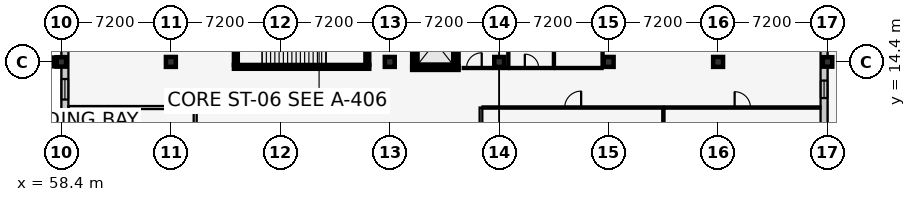
"""IFC4 building model, lengths in metres.
Left out: names, types, materials, properties, quantities, classifications, styles, units other than length and angle.
Written with IfcOpenShell. Run it as: python <this file> out.ifc"""

import sys

from ifc_helpers import new_model, si_unit, direction, frame, frame_2d, origin, origin_2d, place, context, subcontext, project, spatial, rectangle, extrude, element, fill, save


model = new_model("IFC4")
c1 = context("Model", 3, precision=1e-05, world=origin(), true_north=direction((0.0, 1.0)))
c2 = subcontext(c1, "Body", "Model", "MODEL_VIEW")
j1 = project(units=[si_unit("LENGTHUNIT", "METRE"), si_unit("PLANEANGLEUNIT", "RADIAN")], contexts=[c1])
p1 = place(None, origin())
s1 = spatial("IfcSite", under=j1, at=p1, CompositionType="ELEMENT")
p2 = place(p1, origin())
s2 = spatial("IfcBuilding", under=s1, at=p2, CompositionType="ELEMENT")
p3 = place(p2, origin())
s3 = spatial("IfcBuildingStorey", under=s2, at=p3, CompositionType="ELEMENT", Elevation=0.0)
p4 = place(p3, frame((57.6, 14.4, 0.0), z_axis=(0.0, 0.0, 1.0), x_axis=(1.0, 0.0, 0.0)))
e1 = element("IfcColumn", 1, at=p4, inside=s3, PredefinedType="COLUMN", context=c2, shape_type="SweptSolid", body=[
    extrude(rectangle(XDim=0.58, YDim=0.58, at=origin_2d()), origin(), (0.0, 0.0, 1.0), 5.4),
])
p5 = place(p3, frame((58.4, 14.4, 0.0), z_axis=(0.0, 0.0, 1.0), x_axis=(1.0, 0.0, 0.0)))
e2 = element("IfcColumn", 2, at=p5, inside=s3, PredefinedType="COLUMN", context=c2, shape_type="SweptSolid", body=[
    extrude(rectangle(XDim=0.62, YDim=0.62, at=origin_2d()), origin(), (0.0, 0.0, 1.0), 5.4),
])
for number, where, z_axis, x_axis in (
    (3, (65.6, 14.4, 0.0), (0.0, 0.0, 1.0), (1.0, 0.0, 0.0)),
    (4, (80.0, 14.4, 0.0), (0.0, 0.0, 1.0), (1.0, 0.0, 0.0)),
    (5, (87.2, 14.4, 0.0), (0.0, 0.0, 1.0), (1.0, 0.0, 0.0)),
    (6, (94.4, 14.4, 0.0), (0.0, 0.0, 1.0), (1.0, 0.0, 0.0)),
    (7, (101.6, 14.4, 0.0), (0.0, 0.0, 1.0), (1.0, 0.0, 0.0)),
):
    element("IfcColumn", number, at=place(p3, frame(where, z_axis=z_axis, x_axis=x_axis)), inside=s3, PredefinedType="COLUMN", context=c2, shape_type="SweptSolid", body=[
        extrude(rectangle(XDim=0.65, YDim=0.65, at=origin_2d()), origin(), (0.0, 0.0, 1.0), 5.4),
    ])
p6 = place(p3, frame((108.8, 14.4, 0.0), z_axis=(0.0, 0.0, 1.0), x_axis=(1.0, 0.0, 0.0)))
e8 = element("IfcColumn", 8, at=p6, inside=s3, PredefinedType="COLUMN", context=c2, shape_type="SweptSolid", body=[
    extrude(rectangle(XDim=0.62, YDim=0.62, at=origin_2d()), origin(), (0.0, 0.0, 1.0), 5.4),
])
p7 = place(p3, frame((108.57, 21.6, 0.0), z_axis=(0.0, 0.0, 1.0), x_axis=(0.0, -1.0, 0.0)))
e9 = element("IfcWall", 9, at=p7, inside=s3, PredefinedType="SOLIDWALL", context=c2, shape_type="SweptSolid", body=[
    extrude(rectangle(XDim=21.6, YDim=0.46, at=frame_2d((10.8, 0.0))), origin(), (0.0, 0.0, 1.0), 4.545),
])
p8 = place(p7, frame((1.35, 0.0, 0.9)))
e10 = element("IfcOpeningElement", 10, at=p8, cuts=e9, PredefinedType="OPENING", context=c2, shape_type="SweptSolid", body=[
    extrude(rectangle(XDim=0.9, YDim=1.6, at=frame_2d((0.45, 0.8))), frame((0.0, 0.242, 0.0), z_axis=(0.0, -1.0, 0.0), x_axis=(1.0, 0.0, 0.0)), (0.0, 0.0, 1.0), 0.484),
])
p9 = place(p7, frame((4.875, 0.0, 0.9)))
e11 = element("IfcOpeningElement", 11, at=p9, cuts=e9, PredefinedType="OPENING", context=c2, shape_type="SweptSolid", body=[
    extrude(rectangle(XDim=1.05, YDim=1.6, at=frame_2d((0.525, 0.8))), frame((0.0, 0.242, 0.0), z_axis=(0.0, -1.0, 0.0), x_axis=(1.0, 0.0, 0.0)), (0.0, 0.0, 1.0), 0.484),
])
p10 = place(p7, frame((8.425, 0.0, 0.9)))
e12 = element("IfcOpeningElement", 12, at=p10, cuts=e9, PredefinedType="OPENING", context=c2, shape_type="SweptSolid", body=[
    extrude(rectangle(XDim=1.15, YDim=1.6, at=frame_2d((0.575, 0.8))), frame((0.0, 0.242, 0.0), z_axis=(0.0, -1.0, 0.0), x_axis=(1.0, 0.0, 0.0)), (0.0, 0.0, 1.0), 0.484),
])
p11 = place(p7, frame((11.975, 0.0, 0.9)))
e13 = element("IfcOpeningElement", 13, at=p11, cuts=e9, PredefinedType="OPENING", context=c2, shape_type="SweptSolid", body=[
    extrude(rectangle(XDim=1.25, YDim=1.6, at=frame_2d((0.625, 0.8))), frame((0.0, 0.242, 0.0), z_axis=(0.0, -1.0, 0.0), x_axis=(1.0, 0.0, 0.0)), (0.0, 0.0, 1.0), 0.484),
])
p12 = place(p7, frame((15.51, 0.0, 0.9)))
e14 = element("IfcOpeningElement", 14, at=p12, cuts=e9, PredefinedType="OPENING", context=c2, shape_type="SweptSolid", body=[
    extrude(rectangle(XDim=1.38, YDim=1.6, at=frame_2d((0.69, 0.8))), frame((0.0, 0.242, 0.0), z_axis=(0.0, -1.0, 0.0), x_axis=(1.0, 0.0, 0.0)), (0.0, 0.0, 1.0), 0.484),
])
p13 = place(p7, frame((19.05, 0.0, 0.9)))
e15 = element("IfcOpeningElement", 15, at=p13, cuts=e9, PredefinedType="OPENING", context=c2, shape_type="SweptSolid", body=[
    extrude(rectangle(XDim=1.5, YDim=1.6, at=frame_2d((0.75, 0.8))), frame((0.0, 0.242, 0.0), z_axis=(0.0, -1.0, 0.0), x_axis=(1.0, 0.0, 0.0)), (0.0, 0.0, 1.0), 0.484),
])
p14 = place(p3, frame((58.63, 0.0, 0.0), z_axis=(0.0, 0.0, 1.0), x_axis=(0.0, 1.0, 0.0)))
e16 = element("IfcWall", 16, at=p14, inside=s3, PredefinedType="SOLIDWALL", context=c2, shape_type="SweptSolid", body=[
    extrude(rectangle(XDim=21.6, YDim=0.46, at=frame_2d((10.8, 0.0))), origin(), (0.0, 0.0, 1.0), 4.545),
])
p15 = place(p14, frame((1.275, 0.0, 0.9)))
e17 = element("IfcOpeningElement", 17, at=p15, cuts=e16, PredefinedType="OPENING", context=c2, shape_type="SweptSolid", body=[
    extrude(rectangle(XDim=1.05, YDim=1.45, at=frame_2d((0.525, 0.725))), frame((0.0, 0.242, 0.0), z_axis=(0.0, -1.0, 0.0), x_axis=(1.0, 0.0, 0.0)), (0.0, 0.0, 1.0), 0.484),
])
p16 = place(p14, frame((4.825, 0.0, 0.9)))
e18 = element("IfcOpeningElement", 18, at=p16, cuts=e16, PredefinedType="OPENING", context=c2, shape_type="SweptSolid", body=[
    extrude(rectangle(XDim=1.15, YDim=1.45, at=frame_2d((0.575, 0.725))), frame((0.0, 0.242, 0.0), z_axis=(0.0, -1.0, 0.0), x_axis=(1.0, 0.0, 0.0)), (0.0, 0.0, 1.0), 0.484),
])
p17 = place(p14, frame((8.375, 0.0, 0.9)))
e19 = element("IfcOpeningElement", 19, at=p17, cuts=e16, PredefinedType="OPENING", context=c2, shape_type="SweptSolid", body=[
    extrude(rectangle(XDim=1.25, YDim=1.45, at=frame_2d((0.625, 0.725))), frame((0.0, 0.242, 0.0), z_axis=(0.0, -1.0, 0.0), x_axis=(1.0, 0.0, 0.0)), (0.0, 0.0, 1.0), 0.484),
])
p18 = place(p14, frame((11.925, 0.0, 0.9)))
e20 = element("IfcOpeningElement", 20, at=p18, cuts=e16, PredefinedType="OPENING", context=c2, shape_type="SweptSolid", body=[
    extrude(rectangle(XDim=1.35, YDim=1.45, at=frame_2d((0.675, 0.725))), frame((0.0, 0.242, 0.0), z_axis=(0.0, -1.0, 0.0), x_axis=(1.0, 0.0, 0.0)), (0.0, 0.0, 1.0), 0.484),
])
p19 = place(p14, frame((15.475, 0.0, 0.9)))
e21 = element("IfcOpeningElement", 21, at=p19, cuts=e16, PredefinedType="OPENING", context=c2, shape_type="SweptSolid", body=[
    extrude(rectangle(XDim=1.45, YDim=1.45, at=frame_2d((0.725, 0.725))), frame((0.0, 0.242, 0.0), z_axis=(0.0, -1.0, 0.0), x_axis=(1.0, 0.0, 0.0)), (0.0, 0.0, 1.0), 0.484),
])
p20 = place(p14, frame((19.35, 0.0, 0.9)))
e22 = element("IfcOpeningElement", 22, at=p20, cuts=e16, PredefinedType="OPENING", context=c2, shape_type="SweptSolid", body=[
    extrude(rectangle(XDim=0.9, YDim=1.6, at=frame_2d((0.45, 0.8))), frame((0.0, 0.242, 0.0), z_axis=(0.0, -1.0, 0.0), x_axis=(1.0, 0.0, 0.0)), (0.0, 0.0, 1.0), 0.484),
])
p21 = place(p3, frame((69.75, 14.075, 0.0), z_axis=(0.0, 0.0, 1.0), x_axis=(1.0, 0.0, 0.0)))
e23 = element("IfcWall", 23, at=p21, inside=s3, PredefinedType="SHEAR", context=c2, shape_type="SweptSolid", body=[
    extrude(rectangle(XDim=8.9, YDim=0.25, at=frame_2d((4.45, 0.0))), origin(), (0.0, 0.0, 1.0), 5.15),
])
p22 = place(p3, frame((69.875, 17.65, 0.0), z_axis=(0.0, 0.0, 1.0), x_axis=(0.0, -1.0, 0.0)))
e24 = element("IfcWall", 24, at=p22, inside=s3, PredefinedType="SHEAR", context=c2, shape_type="SweptSolid", body=[
    extrude(rectangle(XDim=3.45, YDim=0.25, at=frame_2d((1.725, 0.0))), origin(), (0.0, 0.0, 1.0), 5.15),
])
p23 = place(p22, frame((1.15, 0.0, 0.0)))
e25 = element("IfcOpeningElement", 25, at=p23, cuts=e24, PredefinedType="OPENING", context=c2, shape_type="SweptSolid", body=[
    extrude(rectangle(XDim=1.15, YDim=2.15, at=frame_2d((0.575, 1.075))), frame((0.0, 0.137, 0.0), z_axis=(0.0, -1.0, 0.0), x_axis=(1.0, 0.0, 0.0)), (0.0, 0.0, 1.0), 0.274),
])
p24 = place(p3, frame((78.525, 14.2, 0.0), z_axis=(0.0, 0.0, 1.0), x_axis=(0.0, 1.0, 0.0)))
e26 = element("IfcWall", 26, at=p24, inside=s3, PredefinedType="SHEAR", context=c2, shape_type="SweptSolid", body=[
    extrude(rectangle(XDim=3.45, YDim=0.25, at=frame_2d((1.725, 0.0))), origin(), (0.0, 0.0, 1.0), 5.15),
])
p25 = place(p3, frame((81.475, 14.0, 0.0), z_axis=(0.0, 0.0, 1.0), x_axis=(1.0, 0.0, 0.0)))
e27 = element("IfcWall", 27, at=p25, inside=s3, PredefinedType="SHEAR", context=c2, shape_type="SweptSolid", body=[
    extrude(rectangle(XDim=3.05, YDim=0.25, at=frame_2d((1.525, 0.0))), origin(), (0.0, 0.0, 1.0), 5.15),
])
p26 = place(p25, frame((0.725, 0.0, 0.0)))
e28 = element("IfcOpeningElement", 28, at=p26, cuts=e27, PredefinedType="OPENING", context=c2, shape_type="SweptSolid", body=[
    extrude(rectangle(XDim=1.6, YDim=2.3, at=frame_2d((0.8, 1.15))), frame((0.0, 0.137, 0.0), z_axis=(0.0, -1.0, 0.0), x_axis=(1.0, 0.0, 0.0)), (0.0, 0.0, 1.0), 0.274),
])
for number, where, z_axis, x_axis in (
    (29, (81.6, 17.4, 0.0), (0.0, 0.0, 1.0), (0.0, -1.0, 0.0)),
    (30, (84.4, 14.0, 0.0), (0.0, 0.0, 1.0), (0.0, 1.0, 0.0)),
):
    element("IfcWall", number, at=place(p3, frame(where, z_axis=z_axis, x_axis=x_axis)), inside=s3, PredefinedType="SHEAR", context=c2, shape_type="SweptSolid", body=[
        extrude(rectangle(XDim=3.4, YDim=0.25, at=frame_2d((1.7, 0.0))), origin(), (0.0, 0.0, 1.0), 5.15),
    ])
p27 = place(p3, frame((58.87, 11.4, 0.0), z_axis=(0.0, 0.0, 1.0), x_axis=(1.0, 0.0, 0.0)))
e31 = element("IfcWall", 31, at=p27, inside=s3, PredefinedType="PARTITIONING", context=c2, shape_type="SweptSolid", body=[
    extrude(rectangle(XDim=8.33, YDim=0.2, at=frame_2d((4.165, 0.0))), origin(), (0.0, 0.0, 1.0), 5.15),
])
p28 = place(p3, frame((67.2, 0.47, 0.0), z_axis=(0.0, 0.0, 1.0), x_axis=(0.0, 1.0, 0.0)))
e32 = element("IfcWall", 32, at=p28, inside=s3, PredefinedType="PARTITIONING", context=c2, shape_type="SweptSolid", body=[
    extrude(rectangle(XDim=10.82, YDim=0.2, at=frame_2d((5.41, 0.0))), origin(), (0.0, 0.0, 1.0), 5.15),
])
p29 = place(p28, frame((0.25, 0.0, 0.0)))
e33 = element("IfcOpeningElement", 33, at=p29, cuts=e32, PredefinedType="OPENING", context=c2, shape_type="SweptSolid", body=[
    extrude(rectangle(XDim=1.76, YDim=2.3, at=frame_2d((0.88, 1.15))), frame((0.0, 0.112, 0.0), z_axis=(0.0, -1.0, 0.0), x_axis=(1.0, 0.0, 0.0)), (0.0, 0.0, 1.0), 0.224),
])
p30 = place(p3, frame((86.0, 0.47, 0.0), z_axis=(0.0, 0.0, 1.0), x_axis=(0.0, 1.0, 0.0)))
e34 = element("IfcWall", 34, at=p30, inside=s3, PredefinedType="PARTITIONING", context=c2, shape_type="SweptSolid", body=[
    extrude(rectangle(XDim=10.93, YDim=0.18, at=frame_2d((5.465, 0.0))), origin(), (0.0, 0.0, 1.0), 5.15),
])
p31 = place(p3, frame((86.1, 11.4, 0.0), z_axis=(0.0, 0.0, 1.0), x_axis=(1.0, 0.0, 0.0)))
e35 = element("IfcWall", 35, at=p31, inside=s3, PredefinedType="PARTITIONING", context=c2, shape_type="SweptSolid", body=[
    extrude(rectangle(XDim=11.9, YDim=0.15, at=frame_2d((5.95, 0.0))), origin(), (0.0, 0.0, 1.0), 5.15),
])
p32 = place(p31, frame((5.41, 0.0, 0.0)))
e36 = element("IfcOpeningElement", 36, at=p32, cuts=e35, PredefinedType="OPENING", context=c2, shape_type="SweptSolid", body=[
    extrude(rectangle(XDim=1.08, YDim=2.15, at=frame_2d((0.54, 1.075))), frame((0.0, 0.087, 0.0), z_axis=(0.0, -1.0, 0.0), x_axis=(1.0, 0.0, 0.0)), (0.0, 0.0, 1.0), 0.174),
])
p33 = place(p3, frame((98.0, 0.47, 0.0), z_axis=(0.0, 0.0, 1.0), x_axis=(0.0, 1.0, 0.0)))
e37 = element("IfcWall", 37, at=p33, inside=s3, PredefinedType="PARTITIONING", context=c2, shape_type="SweptSolid", body=[
    extrude(rectangle(XDim=10.845, YDim=0.15, at=frame_2d((5.422, 0.0))), origin(), (0.0, 0.0, 1.0), 4.575),
])
p34 = place(p3, frame((98.085, 11.4, 0.0), z_axis=(0.0, 0.0, 1.0), x_axis=(1.0, 0.0, 0.0)))
e38 = element("IfcWall", 38, at=p34, inside=s3, PredefinedType="PARTITIONING", context=c2, shape_type="SweptSolid", body=[
    extrude(rectangle(XDim=10.245, YDim=0.15, at=frame_2d((5.123, 0.0))), origin(), (0.0, 0.0, 1.0), 5.15),
])
p35 = place(p34, frame((4.603, 0.0, 0.0)))
e39 = element("IfcOpeningElement", 39, at=p35, cuts=e38, PredefinedType="OPENING", context=c2, shape_type="SweptSolid", body=[
    extrude(rectangle(XDim=1.04, YDim=2.15, at=frame_2d((0.52, 1.075))), frame((0.0, 0.087, 0.0), z_axis=(0.0, -1.0, 0.0), x_axis=(1.0, 0.0, 0.0)), (0.0, 0.0, 1.0), 0.174),
])
p36 = place(p3, frame((84.8, 14.0, 0.0), z_axis=(0.0, 0.0, 1.0), x_axis=(1.0, 0.0, 0.0)))
e40 = element("IfcWall", 40, at=p36, inside=s3, PredefinedType="PARTITIONING", context=c2, shape_type="SweptSolid", body=[
    extrude(rectangle(XDim=3.0, YDim=0.14, at=frame_2d((1.5, 0.0))), origin(), (0.0, 0.0, 1.0), 5.15),
])
p37 = place(p36, frame((0.25, 0.0, 0.0)))
e41 = element("IfcOpeningElement", 41, at=p37, cuts=e40, PredefinedType="OPENING", context=c2, shape_type="SweptSolid", body=[
    extrude(rectangle(XDim=1.0, YDim=2.1, at=frame_2d((0.5, 1.05))), frame((0.0, 0.082, 0.0), z_axis=(0.0, -1.0, 0.0), x_axis=(1.0, 0.0, 0.0)), (0.0, 0.0, 1.0), 0.164),
])
p38 = place(p3, frame((87.8, 14.08, 0.0), z_axis=(0.0, 0.0, 1.0), x_axis=(0.0, 1.0, 0.0)))
e42 = element("IfcWall", 42, at=p38, inside=s3, PredefinedType="PARTITIONING", context=c2, shape_type="SweptSolid", body=[
    extrude(rectangle(XDim=7.05, YDim=0.14, at=frame_2d((3.525, 0.0))), origin(), (0.0, 0.0, 1.0), 5.15),
])
p39 = place(p3, frame((87.88, 14.0, 0.0), z_axis=(0.0, 0.0, 1.0), x_axis=(1.0, 0.0, 0.0)))
e43 = element("IfcWall", 43, at=p39, inside=s3, PredefinedType="PARTITIONING", context=c2, shape_type="SweptSolid", body=[
    extrude(rectangle(XDim=2.92, YDim=0.14, at=frame_2d((1.46, 0.0))), origin(), (0.0, 0.0, 1.0), 5.15),
])
p40 = place(p39, frame((1.005, 0.0, 0.0)))
e44 = element("IfcOpeningElement", 44, at=p40, cuts=e43, PredefinedType="OPENING", context=c2, shape_type="SweptSolid", body=[
    extrude(rectangle(XDim=0.91, YDim=2.06, at=frame_2d((0.455, 1.03))), frame((0.0, 0.082, 0.0), z_axis=(0.0, -1.0, 0.0), x_axis=(1.0, 0.0, 0.0)), (0.0, 0.0, 1.0), 0.164),
])
p41 = place(p3, frame((90.8, 14.08, 0.0), z_axis=(0.0, 0.0, 1.0), x_axis=(0.0, 1.0, 0.0)))
e45 = element("IfcWall", 45, at=p41, inside=s3, PredefinedType="PARTITIONING", context=c2, shape_type="SweptSolid", body=[
    extrude(rectangle(XDim=7.05, YDim=0.14, at=frame_2d((3.525, 0.0))), origin(), (0.0, 0.0, 1.0), 4.675),
])
p42 = place(p3, frame((90.88, 14.0, 0.0), z_axis=(0.0, 0.0, 1.0), x_axis=(1.0, 0.0, 0.0)))
e46 = element("IfcWall", 46, at=p42, inside=s3, PredefinedType="PARTITIONING", context=c2, shape_type="SweptSolid", body=[
    extrude(rectangle(XDim=3.12, YDim=0.14, at=frame_2d((1.56, 0.0))), origin(), (0.0, 0.0, 1.0), 5.15),
])
p43 = place(p3, frame((94.0, 14.08, 0.0), z_axis=(0.0, 0.0, 1.0), x_axis=(0.0, 1.0, 0.0)))
e47 = element("IfcWall", 47, at=p43, inside=s3, PredefinedType="PARTITIONING", context=c2, shape_type="SweptSolid", body=[
    extrude(rectangle(XDim=7.05, YDim=0.14, at=frame_2d((3.525, 0.0))), origin(), (0.0, 0.0, 1.0), 5.15),
])
p44 = place(p43, frame((3.08, 0.0, 0.0)))
e48 = element("IfcOpeningElement", 48, at=p44, cuts=e47, PredefinedType="OPENING", context=c2, shape_type="SweptSolid", body=[
    extrude(rectangle(XDim=0.89, YDim=2.05, at=frame_2d((0.445, 1.025))), frame((0.0, 0.082, 0.0), z_axis=(0.0, -1.0, 0.0), x_axis=(1.0, 0.0, 0.0)), (0.0, 0.0, 1.0), 0.164),
])
p45 = place(p10, origin())
e49 = element("IfcWindow", 49, at=p45, inside=s3, PartitioningType="SINGLE_PANEL", PredefinedType="WINDOW", context=c2, shape_type="SweptSolid", body=[
    extrude(rectangle(XDim=1.15, YDim=1.6, at=frame_2d((0.575, 0.8))), frame((0.0, 0.03, 0.0), z_axis=(0.0, -1.0, 0.0), x_axis=(1.0, 0.0, 0.0)), (0.0, 0.0, 1.0), 0.06),
])
fill(e12, e49)
p46 = place(p18, origin())
e50 = element("IfcWindow", 50, at=p46, inside=s3, PartitioningType="SINGLE_PANEL", PredefinedType="WINDOW", context=c2, shape_type="SweptSolid", body=[
    extrude(rectangle(XDim=1.35, YDim=1.45, at=frame_2d((0.675, 0.725))), frame((0.0, 0.03, 0.0), z_axis=(0.0, -1.0, 0.0), x_axis=(1.0, 0.0, 0.0)), (0.0, 0.0, 1.0), 0.06),
])
fill(e20, e50)
p47 = place(p26, origin())
e51 = element("IfcDoor", 51, at=p47, inside=s3, OperationType="DOUBLE_DOOR_SLIDING", PredefinedType="DOOR", context=c2, shape_type="SweptSolid", body=[
    extrude(rectangle(XDim=1.6, YDim=2.3, at=frame_2d((0.8, 1.15))), frame((0.0, 0.025, 0.0), z_axis=(0.0, -1.0, 0.0), x_axis=(1.0, 0.0, 0.0)), (0.0, 0.0, 1.0), 0.05),
])
fill(e28, e51)
p48 = place(p32, origin())
e52 = element("IfcDoor", 52, at=p48, inside=s3, OperationType="SINGLE_SWING_RIGHT", PredefinedType="DOOR", context=c2, shape_type="SweptSolid", body=[
    extrude(rectangle(XDim=1.08, YDim=2.15, at=frame_2d((0.54, 1.075))), frame((0.0, 0.025, 0.0), z_axis=(0.0, -1.0, 0.0), x_axis=(1.0, 0.0, 0.0)), (0.0, 0.0, 1.0), 0.05),
])
fill(e36, e52)
p49 = place(p35, origin())
e53 = element("IfcDoor", 53, at=p49, inside=s3, OperationType="SINGLE_SWING_LEFT", PredefinedType="DOOR", context=c2, shape_type="SweptSolid", body=[
    extrude(rectangle(XDim=1.04, YDim=2.15, at=frame_2d((0.52, 1.075))), frame((0.0, 0.025, 0.0), z_axis=(0.0, -1.0, 0.0), x_axis=(1.0, 0.0, 0.0)), (0.0, 0.0, 1.0), 0.05),
])
fill(e39, e53)
p50 = place(p37, origin())
e54 = element("IfcDoor", 54, at=p50, inside=s3, OperationType="SINGLE_SWING_RIGHT", PredefinedType="DOOR", context=c2, shape_type="SweptSolid", body=[
    extrude(rectangle(XDim=1.0, YDim=2.1, at=frame_2d((0.5, 1.05))), frame((0.0, 0.025, 0.0), z_axis=(0.0, -1.0, 0.0), x_axis=(1.0, 0.0, 0.0)), (0.0, 0.0, 1.0), 0.05),
])
fill(e41, e54)
p51 = place(p40, origin())
e55 = element("IfcDoor", 55, at=p51, inside=s3, OperationType="SINGLE_SWING_LEFT", PredefinedType="DOOR", context=c2, shape_type="SweptSolid", body=[
    extrude(rectangle(XDim=0.91, YDim=2.06, at=frame_2d((0.455, 1.03))), frame((0.0, 0.025, 0.0), z_axis=(0.0, -1.0, 0.0), x_axis=(1.0, 0.0, 0.0)), (0.0, 0.0, 1.0), 0.05),
])
fill(e44, e55)
save(model, sys.argv[1])
